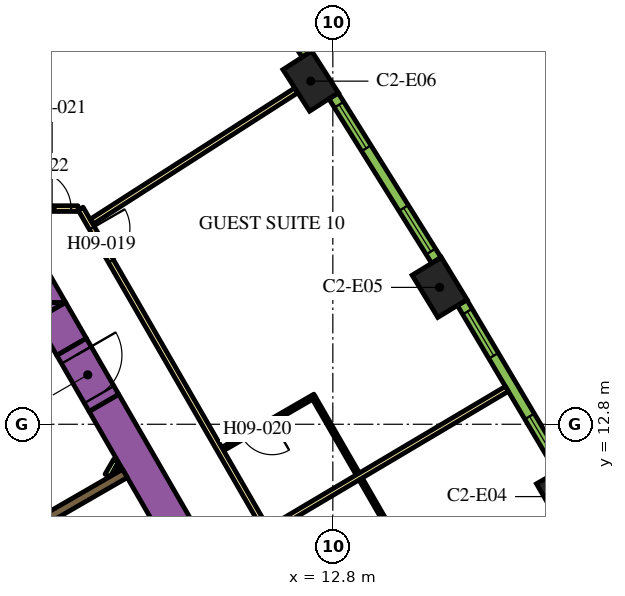
"""IFC4 building model, lengths in metres.
Left out: names, types, materials, properties, quantities, classifications, styles, units other than length and angle.
Written with IfcOpenShell. Run it as: python <this file> out.ifc"""

import sys

from ifc_helpers import new_model, si_unit, direction, frame, frame_2d, origin, origin_2d, place, context, subcontext, project, spatial, polyline, rectangle, outline, extrude, element, fill, save


model = new_model("IFC4")
c1 = context("Model", 3, precision=1e-05, world=origin(), true_north=direction((0.0, 1.0)))
c2 = subcontext(c1, "Body", "Model", "MODEL_VIEW")
j1 = project(units=[si_unit("LENGTHUNIT", "METRE"), si_unit("PLANEANGLEUNIT", "RADIAN")], contexts=[c1])
p1 = place(None, origin())
s1 = spatial("IfcSite", under=j1, at=p1, CompositionType="ELEMENT")
p2 = place(p1, origin())
s2 = spatial("IfcBuilding", under=s1, at=p2, CompositionType="ELEMENT")
p3 = place(p2, frame((0.0, 0.0, 122.7)))
s3 = spatial("IfcBuildingStorey", under=s2, at=p3, CompositionType="ELEMENT", Elevation=122.7)
for number, where, z_axis, x_axis in (
    (1, (18.874, 10.897, 0.0), (0.0, 0.0, 1.0), (-0.5, 0.866, 0.0)),
    (2, (15.609, 16.402, 0.0), (0.0, 0.0, 1.0), (-0.52, 0.854, 0.0)),
    (3, (12.217, 21.828, 0.0), (0.0, 0.0, 1.0), (-0.54, 0.842, 0.0)),
):
    element("IfcColumn", number, at=place(p3, frame(where, z_axis=z_axis, x_axis=x_axis)), inside=s3, PredefinedType="COLUMN", context=c2, shape_type="SweptSolid", body=[
        extrude(rectangle(XDim=1.3, YDim=0.9, at=origin_2d()), origin(), (0.0, 0.0, 1.0), 3.9),
    ])
p4 = place(p3, frame((6.776, 13.364, 0.0), z_axis=(0.0, 0.0, 1.0), x_axis=(0.500004177138, -0.8660229921, 0.0)))
e4 = element("IfcWall", 4, at=p4, inside=s3, PredefinedType="SOLIDWALL", context=c2, shape_type="SweptSolid", body=[
    extrude(rectangle(XDim=20.204, YDim=0.9, at=frame_2d((10.102, 0.0))), origin(), (0.0, 0.0, 1.0), 3.9),
])
p5 = place(p3, origin())
e5 = element("IfcWall", 5, at=p5, inside=s3, PredefinedType="SOLIDWALL", context=c2, shape_type="SweptSolid", body=[
    extrude(outline(polyline([(5.265, 16.0), (5.265, 16.88), (5.773, 16.0), (5.265, 16.0)])), origin(), (0.0, 0.0, 1.0), 3.9),
])
p6 = place(p3, frame((5.926, 14.836, 0.0), z_axis=(0.0, 0.0, 1.0), x_axis=(-0.500076735116, 0.865981096212, 0.0)))
e6 = element("IfcWall", 6, at=p6, inside=s3, PredefinedType="SOLIDWALL", context=c2, shape_type="SweptSolid", body=[
    extrude(rectangle(XDim=1.094, YDim=0.9, at=frame_2d((0.547, 0.0))), origin(), (0.0, 0.0, 1.0), 3.9),
])
e7 = element("IfcWall", 7, at=p5, inside=s3, PredefinedType="SOLIDWALL", context=c2, shape_type="SweptSolid", body=[
    extrude(outline(polyline([(4.734, 16.0), (5.75, 16.0), (4.988, 15.56), (4.734, 16.0)])), origin(), (0.0, 0.0, 1.0), 3.9),
])
e8 = element("IfcWall", 8, at=p5, inside=s3, PredefinedType="SOLIDWALL", context=c2, shape_type="SweptSolid", body=[
    extrude(outline(polyline([(5.27, 10.173), (5.27, 10.173), (4.683, 9.834), (4.504, 9.731), (4.442, 9.839), (4.431, 9.856), (4.419, 9.871), (4.406, 9.885), (4.39, 9.898), (4.374, 9.909), (4.357, 9.918), (4.341, 9.925), (7.266, 11.614), (7.391, 11.398), (5.486, 10.298), (5.486, 10.298), (5.27, 10.173), (5.27, 10.173)])), origin(), (0.0, 0.0, 1.0), 3.9),
])
p7 = place(p3, frame((6.872, 11.45, 0.0), z_axis=(0.0, 0.0, 1.0), x_axis=(0.499846793097, 0.866113839764, 0.0)))
e9 = element("IfcWall", 9, at=p7, inside=s3, PredefinedType="PARTITIONING", context=c2, shape_type="SweptSolid", body=[
    extrude(rectangle(XDim=0.453, YDim=0.15, at=frame_2d((0.227, 0.0))), origin(), (0.0, 0.0, 1.0), 2.75),
])
p8 = place(p3, frame((7.131, 11.6, 0.0), z_axis=(0.0, 0.0, 1.0), x_axis=(0.498600033135, 0.866832167699, 0.0)))
e10 = element("IfcWall", 10, at=p8, inside=s3, PredefinedType="PARTITIONING", context=c2, shape_type="SweptSolid", body=[
    extrude(rectangle(XDim=0.107, YDim=0.15, at=frame_2d((0.053, 0.0))), origin(), (0.0, 0.0, 1.0), 2.75),
])
p9 = place(p3, frame((5.926, 14.836, 0.0), z_axis=(0.0, 0.0, 1.0), x_axis=(0.500062241894, -0.865989465428, 0.0)))
e11 = element("IfcWall", 11, at=p9, inside=s3, PredefinedType="SOLIDWALL", context=c2, shape_type="SweptSolid", body=[
    extrude(rectangle(XDim=1.7, YDim=0.9, at=frame_2d((0.85, 0.0))), origin(), (0.0, 0.0, 1.0), 3.9),
])
p10 = place(p9, frame((0.25, 0.0, 0.0)))
e12 = element("IfcOpeningElement", 12, at=p10, cuts=e11, PredefinedType="OPENING", context=c2, shape_type="SweptSolid", body=[
    extrude(rectangle(XDim=1.2, YDim=2.1, at=frame_2d((0.6, 1.05))), frame((0.0, 0.46, 0.0), z_axis=(0.0, -1.0, 0.0), x_axis=(1.0, 0.0, 0.0)), (0.0, 0.0, 1.0), 0.92),
])
p11 = place(p3, frame((6.163, 18.475, 0.0), z_axis=(0.0, 0.0, 1.0), x_axis=(0.500001317485, -0.866024643133, 0.0)))
e13 = element("IfcWall", 13, at=p11, inside=s3, PredefinedType="PARTITIONING", context=c2, shape_type="SweptSolid", body=[
    extrude(rectangle(XDim=25.767, YDim=0.15, at=frame_2d((12.883, 0.0))), origin(), (0.0, 0.0, 1.0), 2.75),
])
p12 = place(p11, frame((19.306, 0.0, 0.0)))
e14 = element("IfcOpeningElement", 14, at=p12, cuts=e13, PredefinedType="OPENING", context=c2, shape_type="SweptSolid", body=[
    extrude(rectangle(XDim=1.0, YDim=2.1, at=frame_2d((0.5, 1.05))), frame((0.0, 0.085, 0.0), z_axis=(0.0, -1.0, 0.0), x_axis=(1.0, 0.0, 0.0)), (0.0, 0.0, 1.0), 0.17),
])
p13 = place(p11, frame((17.999, 0.0, 0.0)))
e15 = element("IfcOpeningElement", 15, at=p13, cuts=e13, PredefinedType="OPENING", context=c2, shape_type="SweptSolid", body=[
    extrude(rectangle(XDim=1.0, YDim=2.1, at=frame_2d((0.5, 1.05))), frame((0.0, 0.085, 0.0), z_axis=(0.0, -1.0, 0.0), x_axis=(1.0, 0.0, 0.0)), (0.0, 0.0, 1.0), 0.17),
])
p14 = place(p11, frame((0.596, 0.0, 0.0)))
e16 = element("IfcOpeningElement", 16, at=p14, cuts=e13, PredefinedType="OPENING", context=c2, shape_type="SweptSolid", body=[
    extrude(rectangle(XDim=1.0, YDim=2.1, at=frame_2d((0.5, 1.05))), frame((0.0, 0.085, 0.0), z_axis=(0.0, -1.0, 0.0), x_axis=(1.0, 0.0, 0.0)), (0.0, 0.0, 1.0), 0.17),
])
p15 = place(p3, frame((0.825, 18.475, 0.0), z_axis=(0.0, 0.0, 1.0), x_axis=(1.0, 0.0, 0.0)))
e17 = element("IfcWall", 17, at=p15, inside=s3, PredefinedType="PARTITIONING", context=c2, shape_type="SweptSolid", body=[
    extrude(rectangle(XDim=5.268, YDim=0.15, at=frame_2d((2.634, 0.0))), origin(), (0.0, 0.0, 1.0), 2.75),
])
p16 = place(p15, frame((4.088, 0.0, 0.0)))
e18 = element("IfcOpeningElement", 18, at=p16, cuts=e17, PredefinedType="OPENING", context=c2, shape_type="SweptSolid", body=[
    extrude(rectangle(XDim=1.0, YDim=2.1, at=frame_2d((0.5, 1.05))), frame((0.0, 0.085, 0.0), z_axis=(0.0, -1.0, 0.0), x_axis=(1.0, 0.0, 0.0)), (0.0, 0.0, 1.0), 0.17),
])
p17 = place(p3, frame((8.326, 26.923, 0.0), z_axis=(0.0, 0.0, 1.0), x_axis=(-0.828836601893, -0.5594907393, 0.0)))
e19 = element("IfcWall", 19, at=p17, inside=s3, PredefinedType="PARTITIONING", context=c2, shape_type="SweptSolid", body=[
    extrude(rectangle(XDim=8.909, YDim=0.15, at=frame_2d((4.455, 0.0))), origin(), (0.0, 0.0, 1.0), 2.75),
])
p18 = place(p3, frame((11.838, 21.585, 0.0), z_axis=(0.0, 0.0, 1.0), x_axis=(-0.841699322813, -0.539946525108, 0.0)))
e20 = element("IfcWall", 20, at=p18, inside=s3, PredefinedType="PARTITIONING", context=c2, shape_type="SweptSolid", body=[
    extrude(rectangle(XDim=6.392, YDim=0.15, at=frame_2d((3.196, 0.0))), origin(), (0.0, 0.0, 1.0), 2.75),
])
p19 = place(p3, frame((17.379, 13.731, 0.0), z_axis=(0.0, 0.0, 1.0), x_axis=(-0.860132461691, -0.510070728768, 0.0)))
e21 = element("IfcWall", 21, at=p19, inside=s3, PredefinedType="PARTITIONING", context=c2, shape_type="SweptSolid", body=[
    extrude(rectangle(XDim=7.257, YDim=0.15, at=frame_2d((3.628, 0.0))), origin(), (0.0, 0.0, 1.0), 2.75),
])
p20 = place(p3, frame((14.712, 9.318, 0.0), z_axis=(0.0, 0.0, 1.0), x_axis=(-0.50000006957, 0.866025363618, 0.0)))
e22 = element("IfcWall", 22, at=p20, inside=s3, PredefinedType="PARTITIONING", context=c2, shape_type="SweptSolid", body=[
    extrude(rectangle(XDim=2.36, YDim=0.1, at=frame_2d((1.18, 0.0))), origin(), (0.0, 0.0, 1.0), 2.75),
])
p21 = place(p3, frame((12.327, 13.549, 0.0), z_axis=(0.0, 0.0, 1.0), x_axis=(-0.866056369097, -0.49994636267, 0.0)))
e23 = element("IfcWall", 23, at=p21, inside=s3, PredefinedType="PARTITIONING", context=c2, shape_type="SweptSolid", body=[
    extrude(rectangle(XDim=2.8, YDim=0.1, at=frame_2d((1.4, 0.0))), origin(), (0.0, 0.0, 1.0), 2.75),
])
p22 = place(p21, frame((1.3, 0.0, 0.0)))
e24 = element("IfcOpeningElement", 24, at=p22, cuts=e23, PredefinedType="OPENING", context=c2, shape_type="SweptSolid", body=[
    extrude(rectangle(XDim=0.9, YDim=2.1, at=frame_2d((0.45, 1.05))), frame((0.0, 0.06, 0.0), z_axis=(0.0, -1.0, 0.0), x_axis=(1.0, 0.0, 0.0)), (0.0, 0.0, 1.0), 0.12),
])
p23 = place(p3, frame((12.309, 13.481, 0.0), z_axis=(0.0, 0.0, 1.0), x_axis=(0.499968531483, -0.866043571379, 0.0)))
e25 = element("IfcWall", 25, at=p23, inside=s3, PredefinedType="PARTITIONING", context=c2, shape_type="SweptSolid", body=[
    extrude(rectangle(XDim=2.29, YDim=0.1, at=frame_2d((1.145, 0.0))), origin(), (0.0, 0.0, 1.0), 2.75),
])
p24 = place(p3, frame((18.805, 11.611, 0.0), z_axis=(0.0, 0.0, 1.0), x_axis=(-0.510054281659, 0.860142214847, 0.0)))
e26 = element("IfcWall", 26, at=p24, inside=s3, PredefinedType="SOLIDWALL", context=c2, shape_type="SweptSolid", body=[
    extrude(rectangle(XDim=5.101, YDim=0.29, at=frame_2d((2.55, 0.0))), origin(), (0.0, 0.0, 1.0), 3.65),
])
p25 = place(p24, frame((0.273, 0.0, 0.9)))
e27 = element("IfcOpeningElement", 27, at=p25, cuts=e26, PredefinedType="OPENING", context=c2, shape_type="SweptSolid", body=[
    extrude(rectangle(XDim=1.35, YDim=2.15, at=frame_2d((0.675, 1.075))), frame((0.0, 0.155, 0.0), z_axis=(0.0, -1.0, 0.0), x_axis=(1.0, 0.0, 0.0)), (0.0, 0.0, 1.0), 0.31),
])
p26 = place(p24, frame((3.478, 0.0, 0.9)))
e28 = element("IfcOpeningElement", 28, at=p26, cuts=e26, PredefinedType="OPENING", context=c2, shape_type="SweptSolid", body=[
    extrude(rectangle(XDim=1.35, YDim=2.15, at=frame_2d((0.675, 1.075))), frame((0.0, 0.155, 0.0), z_axis=(0.0, -1.0, 0.0), x_axis=(1.0, 0.0, 0.0)), (0.0, 0.0, 1.0), 0.31),
])
p27 = place(p3, frame((15.524, 17.114, 0.0), z_axis=(0.0, 0.0, 1.0), x_axis=(-0.530072082134, 0.847952585787, 0.0)))
e29 = element("IfcWall", 29, at=p27, inside=s3, PredefinedType="SOLIDWALL", context=c2, shape_type="SweptSolid", body=[
    extrude(rectangle(XDim=5.1, YDim=0.29, at=frame_2d((2.55, 0.0))), origin(), (0.0, 0.0, 1.0), 3.65),
])
p28 = place(p27, frame((0.273, 0.0, 0.9)))
e30 = element("IfcOpeningElement", 30, at=p28, cuts=e29, PredefinedType="OPENING", context=c2, shape_type="SweptSolid", body=[
    extrude(rectangle(XDim=1.35, YDim=2.15, at=frame_2d((0.675, 1.075))), frame((0.0, 0.155, 0.0), z_axis=(0.0, -1.0, 0.0), x_axis=(1.0, 0.0, 0.0)), (0.0, 0.0, 1.0), 0.31),
])
p29 = place(p27, frame((3.478, 0.0, 0.9)))
e31 = element("IfcOpeningElement", 31, at=p29, cuts=e29, PredefinedType="OPENING", context=c2, shape_type="SweptSolid", body=[
    extrude(rectangle(XDim=1.35, YDim=2.15, at=frame_2d((0.675, 1.075))), frame((0.0, 0.155, 0.0), z_axis=(0.0, -1.0, 0.0), x_axis=(1.0, 0.0, 0.0)), (0.0, 0.0, 1.0), 0.31),
])
p30 = place(p3, frame((12.115, 22.539, 0.0), z_axis=(0.0, 0.0, 1.0), x_axis=(-0.549741341923, 0.835334937005, 0.0)))
e32 = element("IfcWall", 32, at=p30, inside=s3, PredefinedType="SOLIDWALL", context=c2, shape_type="SweptSolid", body=[
    extrude(rectangle(XDim=5.1, YDim=0.29, at=frame_2d((2.55, 0.0))), origin(), (0.0, 0.0, 1.0), 3.65),
])
p31 = place(p30, frame((0.273, 0.0, 0.9)))
e33 = element("IfcOpeningElement", 33, at=p31, cuts=e32, PredefinedType="OPENING", context=c2, shape_type="SweptSolid", body=[
    extrude(rectangle(XDim=1.35, YDim=2.15, at=frame_2d((0.675, 1.075))), frame((0.0, 0.155, 0.0), z_axis=(0.0, -1.0, 0.0), x_axis=(1.0, 0.0, 0.0)), (0.0, 0.0, 1.0), 0.31),
])
p32 = place(p30, frame((3.478, 0.0, 0.9)))
e34 = element("IfcOpeningElement", 34, at=p32, cuts=e32, PredefinedType="OPENING", context=c2, shape_type="SweptSolid", body=[
    extrude(rectangle(XDim=1.35, YDim=2.15, at=frame_2d((0.675, 1.075))), frame((0.0, 0.155, 0.0), z_axis=(0.0, -1.0, 0.0), x_axis=(1.0, 0.0, 0.0)), (0.0, 0.0, 1.0), 0.31),
])
p33 = place(p10, origin())
e35 = element("IfcDoor", 35, at=p33, inside=s3, OperationType="SINGLE_SWING_LEFT", PredefinedType="DOOR", context=c2, shape_type="SweptSolid", body=[
    extrude(rectangle(XDim=1.2, YDim=2.1, at=frame_2d((0.6, 1.05))), frame((0.0, 0.025, 0.0), z_axis=(0.0, -1.0, 0.0), x_axis=(1.0, 0.0, 0.0)), (0.0, 0.0, 1.0), 0.05),
])
fill(e12, e35)
p34 = place(p14, origin())
e36 = element("IfcDoor", 36, at=p34, inside=s3, OperationType="SINGLE_SWING_LEFT", PredefinedType="DOOR", context=c2, shape_type="SweptSolid", body=[
    extrude(rectangle(XDim=1.0, YDim=2.1, at=frame_2d((0.5, 1.05))), frame((0.0, 0.025, 0.0), z_axis=(0.0, -1.0, 0.0), x_axis=(1.0, 0.0, 0.0)), (0.0, 0.0, 1.0), 0.05),
])
fill(e16, e36)
p35 = place(p22, origin())
e37 = element("IfcDoor", 37, at=p35, inside=s3, OperationType="SINGLE_SWING_LEFT", PredefinedType="DOOR", context=c2, shape_type="SweptSolid", body=[
    extrude(rectangle(XDim=0.9, YDim=2.1, at=frame_2d((0.45, 1.05))), frame((0.0, 0.025, 0.0), z_axis=(0.0, -1.0, 0.0), x_axis=(1.0, 0.0, 0.0)), (0.0, 0.0, 1.0), 0.05),
])
fill(e24, e37)
p36 = place(p16, origin())
e38 = element("IfcDoor", 38, at=p36, inside=s3, OperationType="SINGLE_SWING_RIGHT", PredefinedType="DOOR", context=c2, shape_type="SweptSolid", body=[
    extrude(rectangle(XDim=1.0, YDim=2.1, at=frame_2d((0.5, 1.05))), frame((0.0, 0.025, 0.0), z_axis=(0.0, -1.0, 0.0), x_axis=(1.0, 0.0, 0.0)), (0.0, 0.0, 1.0), 0.05),
])
fill(e18, e38)
p37 = place(p25, origin())
e39 = element("IfcWindow", 39, at=p37, inside=s3, PartitioningType="DOUBLE_PANEL_VERTICAL", PredefinedType="WINDOW", context=c2, shape_type="SweptSolid", body=[
    extrude(rectangle(XDim=1.35, YDim=2.15, at=frame_2d((0.675, 1.075))), frame((0.0, 0.015, 0.0), z_axis=(0.0, -1.0, 0.0), x_axis=(1.0, 0.0, 0.0)), (0.0, 0.0, 1.0), 0.06),
])
fill(e27, e39)
p38 = place(p26, origin())
e40 = element("IfcWindow", 40, at=p38, inside=s3, PartitioningType="DOUBLE_PANEL_VERTICAL", PredefinedType="WINDOW", context=c2, shape_type="SweptSolid", body=[
    extrude(rectangle(XDim=1.35, YDim=2.15, at=frame_2d((0.675, 1.075))), frame((0.0, 0.015, 0.0), z_axis=(0.0, -1.0, 0.0), x_axis=(1.0, 0.0, 0.0)), (0.0, 0.0, 1.0), 0.06),
])
fill(e28, e40)
p39 = place(p28, origin())
e41 = element("IfcWindow", 41, at=p39, inside=s3, PartitioningType="DOUBLE_PANEL_VERTICAL", PredefinedType="WINDOW", context=c2, shape_type="SweptSolid", body=[
    extrude(rectangle(XDim=1.35, YDim=2.15, at=frame_2d((0.675, 1.075))), frame((0.0, 0.015, 0.0), z_axis=(0.0, -1.0, 0.0), x_axis=(1.0, 0.0, 0.0)), (0.0, 0.0, 1.0), 0.06),
])
fill(e30, e41)
p40 = place(p29, origin())
e42 = element("IfcWindow", 42, at=p40, inside=s3, PartitioningType="DOUBLE_PANEL_VERTICAL", PredefinedType="WINDOW", context=c2, shape_type="SweptSolid", body=[
    extrude(rectangle(XDim=1.35, YDim=2.15, at=frame_2d((0.675, 1.075))), frame((0.0, 0.015, 0.0), z_axis=(0.0, -1.0, 0.0), x_axis=(1.0, 0.0, 0.0)), (0.0, 0.0, 1.0), 0.06),
])
fill(e31, e42)
save(model, sys.argv[1])
